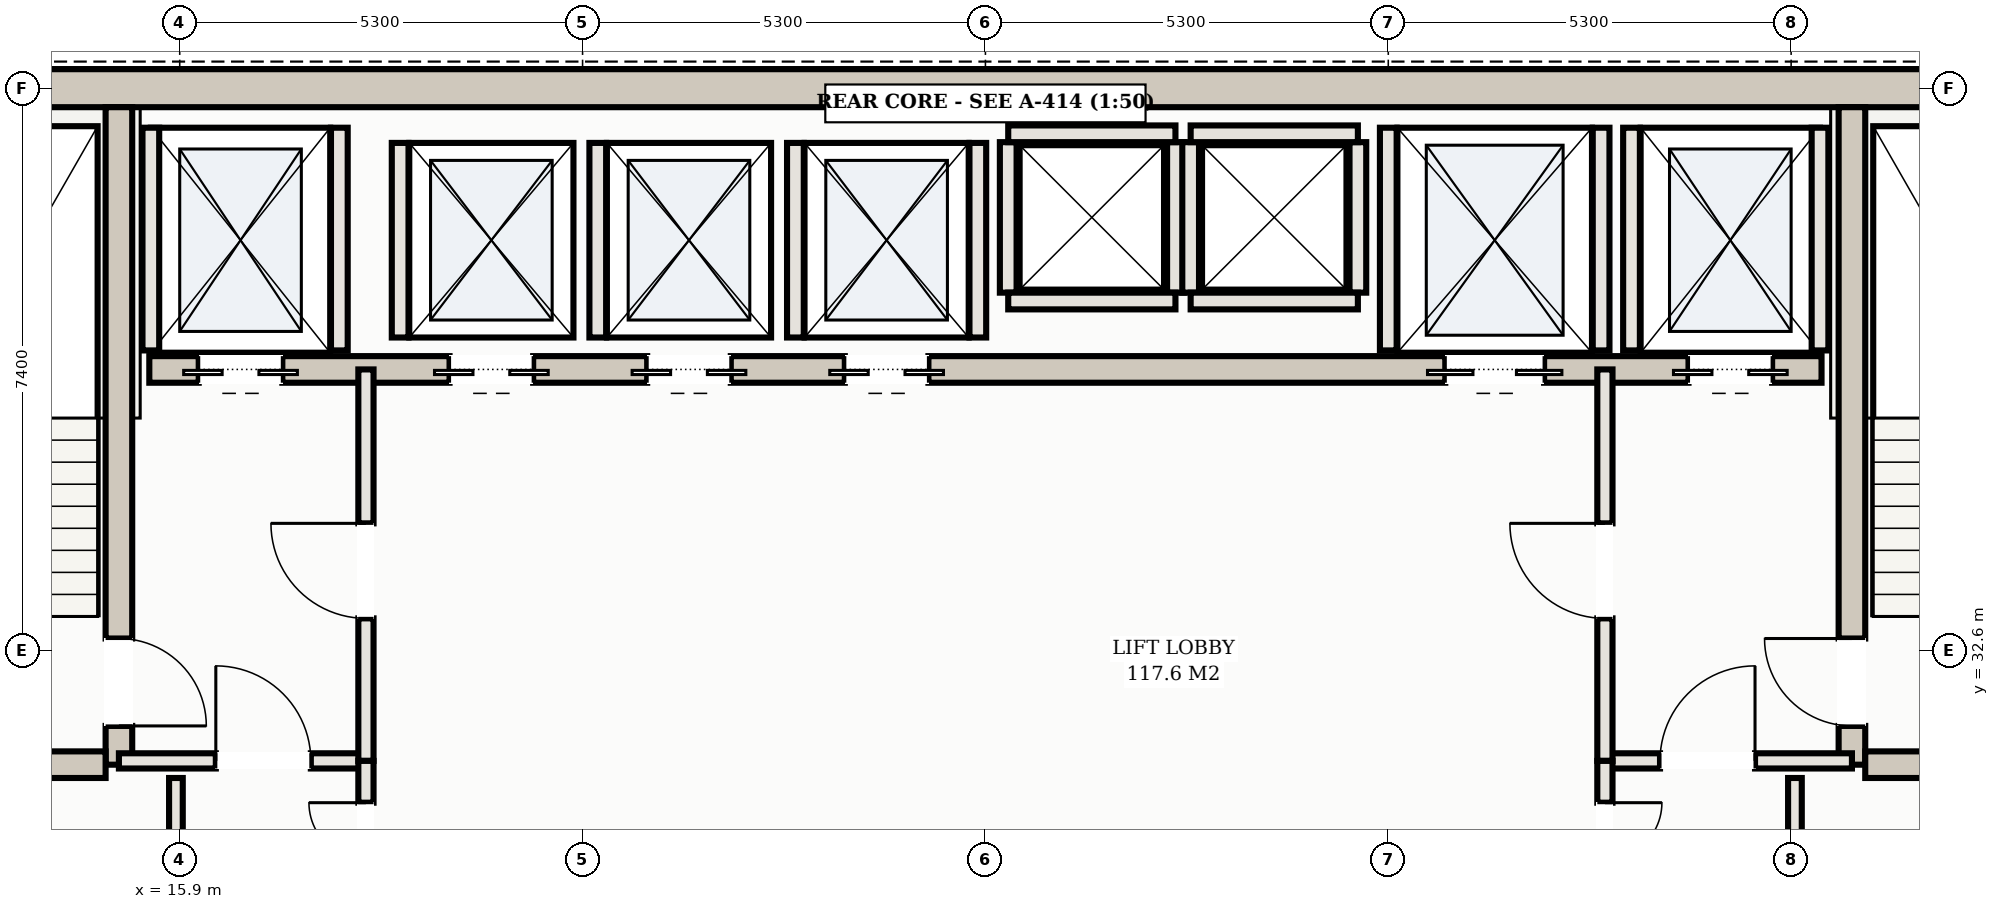
"""IFC4 building model, lengths in metres.
Left out: names, types, materials, properties, quantities, classifications, styles, units other than length and angle.
Written with IfcOpenShell. Run it as: python <this file> out.ifc"""

import sys

from ifc_helpers import new_model, si_unit, direction, frame, frame_2d, origin, place, context, subcontext, project, spatial, rectangle, extrude, element, fill, save


model = new_model("IFC4")
c1 = context("Model", 3, precision=1e-05, world=origin(), true_north=direction((0.0, 1.0)))
c2 = subcontext(c1, "Body", "Model", "MODEL_VIEW")
j1 = project(units=[si_unit("LENGTHUNIT", "METRE"), si_unit("PLANEANGLEUNIT", "RADIAN")], contexts=[c1])
p1 = place(None, origin())
s1 = spatial("IfcSite", under=j1, at=p1, CompositionType="ELEMENT")
p2 = place(p1, origin())
s2 = spatial("IfcBuilding", under=s1, at=p2, CompositionType="ELEMENT")
p3 = place(p2, frame((0.0, 0.0, 203.3)))
s3 = spatial("IfcBuildingStorey", under=s2, at=p3, CompositionType="ELEMENT", Elevation=203.3)
p4 = place(p3, frame((10.35, 40.0, 0.0), z_axis=(0.0, 0.0, 1.0), x_axis=(1.0, 0.0, 0.0)))
e1 = element("IfcWall", 1, at=p4, inside=s3, PredefinedType="SHEAR", context=c2, shape_type="SweptSolid", body=[
    extrude(rectangle(XDim=32.3, YDim=0.5, at=frame_2d((16.15, 0.0))), origin(), (0.0, 0.0, 1.0), 3.11),
])
p5 = place(p3, frame((15.1, 31.1, 0.0), z_axis=(0.0, 0.0, 1.0), x_axis=(0.0, 1.0, 0.0)))
e2 = element("IfcWall", 2, at=p5, inside=s3, PredefinedType="SHEAR", context=c2, shape_type="SweptSolid", body=[
    extrude(rectangle(XDim=8.65, YDim=0.35, at=frame_2d((4.325, 0.0))), origin(), (0.0, 0.0, 1.0), 3.11),
])
p6 = place(p5, frame((0.51, 0.0, 0.0)))
e3 = element("IfcOpeningElement", 3, at=p6, cuts=e2, PredefinedType="OPENING", context=c2, shape_type="SweptSolid", body=[
    extrude(rectangle(XDim=1.15, YDim=2.2, at=frame_2d((0.575, 1.1))), frame((0.0, 0.185, 0.0), z_axis=(0.0, -1.0, 0.0), x_axis=(1.0, 0.0, 0.0)), (0.0, 0.0, 1.0), 0.37),
])
p7 = place(p3, frame((10.85, 31.1, 0.0), z_axis=(0.0, 0.0, 1.0), x_axis=(1.0, 0.0, 0.0)))
e4 = element("IfcWall", 4, at=p7, inside=s3, PredefinedType="SHEAR", context=c2, shape_type="SweptSolid", body=[
    extrude(rectangle(XDim=4.075, YDim=0.35, at=frame_2d((2.038, 0.0))), origin(), (0.0, 0.0, 1.0), 3.11),
])
p8 = place(p3, frame((37.9, 31.1, 0.0), z_axis=(0.0, 0.0, 1.0), x_axis=(0.0, 1.0, 0.0)))
e5 = element("IfcWall", 5, at=p8, inside=s3, PredefinedType="SHEAR", context=c2, shape_type="SweptSolid", body=[
    extrude(rectangle(XDim=8.65, YDim=0.35, at=frame_2d((4.325, 0.0))), origin(), (0.0, 0.0, 1.0), 3.11),
])
p9 = place(p8, frame((0.51, 0.0, 0.0)))
e6 = element("IfcOpeningElement", 6, at=p9, cuts=e5, PredefinedType="OPENING", context=c2, shape_type="SweptSolid", body=[
    extrude(rectangle(XDim=1.15, YDim=2.2, at=frame_2d((0.575, 1.1))), frame((0.0, 0.185, 0.0), z_axis=(0.0, -1.0, 0.0), x_axis=(1.0, 0.0, 0.0)), (0.0, 0.0, 1.0), 0.37),
])
p10 = place(p3, frame((38.075, 31.1, 0.0), z_axis=(0.0, 0.0, 1.0), x_axis=(1.0, 0.0, 0.0)))
e7 = element("IfcWall", 7, at=p10, inside=s3, PredefinedType="SHEAR", context=c2, shape_type="SweptSolid", body=[
    extrude(rectangle(XDim=4.075, YDim=0.35, at=frame_2d((2.038, 0.0))), origin(), (0.0, 0.0, 1.0), 3.11),
])
p11 = place(p3, frame((15.5, 36.3, 0.0), z_axis=(0.0, 0.0, 1.0), x_axis=(1.0, 0.0, 0.0)))
e8 = element("IfcWall", 8, at=p11, inside=s3, PredefinedType="SHEAR", context=c2, shape_type="SweptSolid", body=[
    extrude(rectangle(XDim=22.0, YDim=0.35, at=frame_2d((11.0, 0.0))), origin(), (0.0, 0.0, 1.0), 3.11),
])
p12 = place(p11, frame((0.65, 0.0, 0.0)))
e9 = element("IfcOpeningElement", 9, at=p12, cuts=e8, PredefinedType="OPENING", context=c2, shape_type="SweptSolid", body=[
    extrude(rectangle(XDim=1.1, YDim=2.15, at=frame_2d((0.55, 1.075))), frame((0.0, 0.185, 0.0), z_axis=(0.0, -1.0, 0.0), x_axis=(1.0, 0.0, 0.0)), (0.0, 0.0, 1.0), 0.37),
])
p13 = place(p11, frame((20.25, 0.0, 0.0)))
e10 = element("IfcOpeningElement", 10, at=p13, cuts=e8, PredefinedType="OPENING", context=c2, shape_type="SweptSolid", body=[
    extrude(rectangle(XDim=1.1, YDim=2.15, at=frame_2d((0.55, 1.075))), frame((0.0, 0.185, 0.0), z_axis=(0.0, -1.0, 0.0), x_axis=(1.0, 0.0, 0.0)), (0.0, 0.0, 1.0), 0.37),
])
p14 = place(p11, frame((17.05, 0.0, 0.0)))
e11 = element("IfcOpeningElement", 11, at=p14, cuts=e8, PredefinedType="OPENING", context=c2, shape_type="SweptSolid", body=[
    extrude(rectangle(XDim=1.3, YDim=2.2, at=frame_2d((0.65, 1.1))), frame((0.0, 0.185, 0.0), z_axis=(0.0, -1.0, 0.0), x_axis=(1.0, 0.0, 0.0)), (0.0, 0.0, 1.0), 0.37),
])
p15 = place(p11, frame((3.95, 0.0, 0.0)))
e12 = element("IfcOpeningElement", 12, at=p15, cuts=e8, PredefinedType="OPENING", context=c2, shape_type="SweptSolid", body=[
    extrude(rectangle(XDim=1.1, YDim=2.15, at=frame_2d((0.55, 1.075))), frame((0.0, 0.185, 0.0), z_axis=(0.0, -1.0, 0.0), x_axis=(1.0, 0.0, 0.0)), (0.0, 0.0, 1.0), 0.37),
])
p16 = place(p11, frame((6.55, 0.0, 0.0)))
e13 = element("IfcOpeningElement", 13, at=p16, cuts=e8, PredefinedType="OPENING", context=c2, shape_type="SweptSolid", body=[
    extrude(rectangle(XDim=1.1, YDim=2.15, at=frame_2d((0.55, 1.075))), frame((0.0, 0.185, 0.0), z_axis=(0.0, -1.0, 0.0), x_axis=(1.0, 0.0, 0.0)), (0.0, 0.0, 1.0), 0.37),
])
p17 = place(p11, frame((9.15, 0.0, 0.0)))
e14 = element("IfcOpeningElement", 14, at=p17, cuts=e8, PredefinedType="OPENING", context=c2, shape_type="SweptSolid", body=[
    extrude(rectangle(XDim=1.1, YDim=2.15, at=frame_2d((0.55, 1.075))), frame((0.0, 0.185, 0.0), z_axis=(0.0, -1.0, 0.0), x_axis=(1.0, 0.0, 0.0)), (0.0, 0.0, 1.0), 0.37),
])
for number, where, z_axis, x_axis in (
    (15, (15.52, 36.55, 0.0), (0.0, 0.0, 1.0), (0.0, 1.0, 0.0)),
    (16, (18.0, 36.55, 0.0), (0.0, 0.0, 1.0), (0.0, 1.0, 0.0)),
    (17, (35.0, 36.55, 0.0), (0.0, 0.0, 1.0), (0.0, 1.0, 0.0)),
    (18, (37.48, 36.55, 0.0), (0.0, 0.0, 1.0), (0.0, 1.0, 0.0)),
    (19, (31.8, 36.55, 0.0), (0.0, 0.0, 1.0), (0.0, 1.0, 0.0)),
    (20, (34.6, 36.55, 0.0), (0.0, 0.0, 1.0), (0.0, 1.0, 0.0)),
):
    element("IfcWall", number, at=place(p3, frame(where, z_axis=z_axis, x_axis=x_axis)), inside=s3, PredefinedType="SOLIDWALL", context=c2, shape_type="SweptSolid", body=[
        extrude(rectangle(XDim=2.93, YDim=0.22, at=frame_2d((1.465, 0.0))), origin(), (0.0, 0.0, 1.0), 3.11),
    ])
for number, where, z_axis, x_axis in (
    (21, (18.8, 36.72, 0.0), (0.0, 0.0, 1.0), (0.0, 1.0, 0.0)),
    (22, (21.4, 36.72, 0.0), (0.0, 0.0, 1.0), (0.0, 1.0, 0.0)),
    (23, (24.0, 36.72, 0.0), (0.0, 0.0, 1.0), (0.0, 1.0, 0.0)),
    (24, (26.4, 36.72, 0.0), (0.0, 0.0, 1.0), (0.0, 1.0, 0.0)),
):
    element("IfcWall", number, at=place(p3, frame(where, z_axis=z_axis, x_axis=x_axis)), inside=s3, PredefinedType="SOLIDWALL", context=c2, shape_type="SweptSolid", body=[
        extrude(rectangle(XDim=2.56, YDim=0.22, at=frame_2d((1.28, 0.0))), origin(), (0.0, 0.0, 1.0), 3.11),
    ])
for number, where, z_axis, x_axis in (
    (25, (26.8, 37.31, 0.0), (0.0, 0.0, 1.0), (0.0, 1.0, 0.0)),
    (26, (29.0, 37.31, 0.0), (0.0, 0.0, 1.0), (0.0, 1.0, 0.0)),
):
    element("IfcWall", number, at=place(p3, frame(where, z_axis=z_axis, x_axis=x_axis)), inside=s3, PredefinedType="SOLIDWALL", context=c2, shape_type="SweptSolid", body=[
        extrude(rectangle(XDim=1.98, YDim=0.22, at=frame_2d((0.99, 0.0))), origin(), (0.0, 0.0, 1.0), 3.11),
    ])
for number, where, z_axis, x_axis in (
    (27, (26.8, 39.4, 0.0), (0.0, 0.0, 1.0), (1.0, 0.0, 0.0)),
    (28, (26.8, 37.2, 0.0), (0.0, 0.0, 1.0), (1.0, 0.0, 0.0)),
):
    element("IfcWall", number, at=place(p3, frame(where, z_axis=z_axis, x_axis=x_axis)), inside=s3, PredefinedType="SOLIDWALL", context=c2, shape_type="SweptSolid", body=[
        extrude(rectangle(XDim=2.2, YDim=0.22, at=frame_2d((1.1, 0.0))), origin(), (0.0, 0.0, 1.0), 3.11),
    ])
for number, where, z_axis, x_axis in (
    (29, (29.2, 37.31, 0.0), (0.0, 0.0, 1.0), (0.0, 1.0, 0.0)),
    (30, (31.4, 37.31, 0.0), (0.0, 0.0, 1.0), (0.0, 1.0, 0.0)),
):
    element("IfcWall", number, at=place(p3, frame(where, z_axis=z_axis, x_axis=x_axis)), inside=s3, PredefinedType="SOLIDWALL", context=c2, shape_type="SweptSolid", body=[
        extrude(rectangle(XDim=1.98, YDim=0.22, at=frame_2d((0.99, 0.0))), origin(), (0.0, 0.0, 1.0), 3.11),
    ])
for number, where, z_axis, x_axis in (
    (31, (29.2, 39.4, 0.0), (0.0, 0.0, 1.0), (1.0, 0.0, 0.0)),
    (32, (29.2, 37.2, 0.0), (0.0, 0.0, 1.0), (1.0, 0.0, 0.0)),
):
    element("IfcWall", number, at=place(p3, frame(where, z_axis=z_axis, x_axis=x_axis)), inside=s3, PredefinedType="SOLIDWALL", context=c2, shape_type="SweptSolid", body=[
        extrude(rectangle(XDim=2.2, YDim=0.22, at=frame_2d((1.1, 0.0))), origin(), (0.0, 0.0, 1.0), 3.11),
    ])
p18 = place(p3, frame((15.1, 31.15, 0.0), z_axis=(0.0, 0.0, 1.0), x_axis=(1.0, 0.0, 0.0)))
e33 = element("IfcWall", 33, at=p18, inside=s3, PredefinedType="PARTITIONING", context=c2, shape_type="SweptSolid", body=[
    extrude(rectangle(XDim=3.25, YDim=0.2, at=frame_2d((1.625, 0.0))), origin(), (0.0, 0.0, 1.0), 2.43),
])
p19 = place(p18, frame((1.275, 0.0, 0.0)))
e34 = element("IfcOpeningElement", 34, at=p19, cuts=e33, PredefinedType="OPENING", context=c2, shape_type="SweptSolid", body=[
    extrude(rectangle(XDim=1.25, YDim=2.2, at=frame_2d((0.625, 1.1))), frame((0.0, 0.11, 0.0), z_axis=(0.0, -1.0, 0.0), x_axis=(1.0, 0.0, 0.0)), (0.0, 0.0, 1.0), 0.22),
])
p20 = place(p3, frame((18.35, 31.15, 0.0), z_axis=(0.0, 0.0, 1.0), x_axis=(0.0, 1.0, 0.0)))
e35 = element("IfcWall", 35, at=p20, inside=s3, PredefinedType="PARTITIONING", context=c2, shape_type="SweptSolid", body=[
    extrude(rectangle(XDim=5.15, YDim=0.2, at=frame_2d((2.575, 0.0))), origin(), (0.0, 0.0, 1.0), 2.43),
])
p21 = place(p20, frame((1.875, 0.0, 0.0)))
e36 = element("IfcOpeningElement", 36, at=p21, cuts=e35, PredefinedType="OPENING", context=c2, shape_type="SweptSolid", body=[
    extrude(rectangle(XDim=1.25, YDim=2.2, at=frame_2d((0.625, 1.1))), frame((0.0, 0.11, 0.0), z_axis=(0.0, -1.0, 0.0), x_axis=(1.0, 0.0, 0.0)), (0.0, 0.0, 1.0), 0.22),
])
p22 = place(p3, frame((34.65, 31.15, 0.0), z_axis=(0.0, 0.0, 1.0), x_axis=(1.0, 0.0, 0.0)))
e37 = element("IfcWall", 37, at=p22, inside=s3, PredefinedType="PARTITIONING", context=c2, shape_type="SweptSolid", body=[
    extrude(rectangle(XDim=3.25, YDim=0.2, at=frame_2d((1.625, 0.0))), origin(), (0.0, 0.0, 1.0), 2.43),
])
p23 = place(p22, frame((0.725, 0.0, 0.0)))
e38 = element("IfcOpeningElement", 38, at=p23, cuts=e37, PredefinedType="OPENING", context=c2, shape_type="SweptSolid", body=[
    extrude(rectangle(XDim=1.25, YDim=2.2, at=frame_2d((0.625, 1.1))), frame((0.0, 0.11, 0.0), z_axis=(0.0, -1.0, 0.0), x_axis=(1.0, 0.0, 0.0)), (0.0, 0.0, 1.0), 0.22),
])
p24 = place(p3, frame((34.65, 31.15, 0.0), z_axis=(0.0, 0.0, 1.0), x_axis=(0.0, 1.0, 0.0)))
e39 = element("IfcWall", 39, at=p24, inside=s3, PredefinedType="PARTITIONING", context=c2, shape_type="SweptSolid", body=[
    extrude(rectangle(XDim=5.15, YDim=0.2, at=frame_2d((2.575, 0.0))), origin(), (0.0, 0.0, 1.0), 2.43),
])
p25 = place(p24, frame((1.875, 0.0, 0.0)))
e40 = element("IfcOpeningElement", 40, at=p25, cuts=e39, PredefinedType="OPENING", context=c2, shape_type="SweptSolid", body=[
    extrude(rectangle(XDim=1.25, YDim=2.2, at=frame_2d((0.625, 1.1))), frame((0.0, 0.11, 0.0), z_axis=(0.0, -1.0, 0.0), x_axis=(1.0, 0.0, 0.0)), (0.0, 0.0, 1.0), 0.22),
])
p26 = place(p3, frame((15.85, 25.45, 0.0), z_axis=(0.0, 0.0, 1.0), x_axis=(0.0, 1.0, 0.0)))
e41 = element("IfcWall", 41, at=p26, inside=s3, PredefinedType="PARTITIONING", context=c2, shape_type="SweptSolid", body=[
    extrude(rectangle(XDim=5.475, YDim=0.18, at=frame_2d((2.738, 0.0))), origin(), (0.0, 0.0, 1.0), 2.43),
])
p27 = place(p26, frame((2.277, 0.0, 0.0)))
e42 = element("IfcOpeningElement", 42, at=p27, cuts=e41, PredefinedType="OPENING", context=c2, shape_type="SweptSolid", body=[
    extrude(rectangle(XDim=0.92, YDim=2.15, at=frame_2d((0.46, 1.075))), frame((0.0, 0.1, 0.0), z_axis=(0.0, -1.0, 0.0), x_axis=(1.0, 0.0, 0.0)), (0.0, 0.0, 1.0), 0.2),
])
p28 = place(p3, frame((37.15, 25.45, 0.0), z_axis=(0.0, 0.0, 1.0), x_axis=(0.0, 1.0, 0.0)))
e43 = element("IfcWall", 43, at=p28, inside=s3, PredefinedType="PARTITIONING", context=c2, shape_type="SweptSolid", body=[
    extrude(rectangle(XDim=5.475, YDim=0.18, at=frame_2d((2.738, 0.0))), origin(), (0.0, 0.0, 1.0), 2.43),
])
p29 = place(p28, frame((2.277, 0.0, 0.0)))
e44 = element("IfcOpeningElement", 44, at=p29, cuts=e43, PredefinedType="OPENING", context=c2, shape_type="SweptSolid", body=[
    extrude(rectangle(XDim=0.92, YDim=2.15, at=frame_2d((0.46, 1.075))), frame((0.0, 0.1, 0.0), z_axis=(0.0, -1.0, 0.0), x_axis=(1.0, 0.0, 0.0)), (0.0, 0.0, 1.0), 0.2),
])
p30 = place(p3, frame((18.35, 28.55, 0.0), z_axis=(0.0, 0.0, 1.0), x_axis=(0.0, 1.0, 0.0)))
e45 = element("IfcWall", 45, at=p30, inside=s3, PredefinedType="PARTITIONING", context=c2, shape_type="SweptSolid", body=[
    extrude(rectangle(XDim=2.6, YDim=0.2, at=frame_2d((1.3, 0.0))), origin(), (0.0, 0.0, 1.0), 2.43),
])
p31 = place(p30, frame((0.55, 0.0, 0.0)))
e46 = element("IfcOpeningElement", 46, at=p31, cuts=e45, PredefinedType="OPENING", context=c2, shape_type="SweptSolid", body=[
    extrude(rectangle(XDim=1.5, YDim=2.25, at=frame_2d((0.75, 1.125))), frame((0.0, 0.11, 0.0), z_axis=(0.0, -1.0, 0.0), x_axis=(1.0, 0.0, 0.0)), (0.0, 0.0, 1.0), 0.22),
])
p32 = place(p3, frame((34.65, 28.55, 0.0), z_axis=(0.0, 0.0, 1.0), x_axis=(0.0, 1.0, 0.0)))
e47 = element("IfcWall", 47, at=p32, inside=s3, PredefinedType="PARTITIONING", context=c2, shape_type="SweptSolid", body=[
    extrude(rectangle(XDim=2.6, YDim=0.2, at=frame_2d((1.3, 0.0))), origin(), (0.0, 0.0, 1.0), 2.43),
])
p33 = place(p32, frame((0.55, 0.0, 0.0)))
e48 = element("IfcOpeningElement", 48, at=p33, cuts=e47, PredefinedType="OPENING", context=c2, shape_type="SweptSolid", body=[
    extrude(rectangle(XDim=1.5, YDim=2.25, at=frame_2d((0.75, 1.125))), frame((0.0, 0.11, 0.0), z_axis=(0.0, -1.0, 0.0), x_axis=(1.0, 0.0, 0.0)), (0.0, 0.0, 1.0), 0.22),
])
p34 = place(p12, frame((1.1, 0.0, 0.0), z_axis=(0.0, 0.0, 1.0), x_axis=(-1.0, 0.0, 0.0)))
e49 = element("IfcDoor", 49, at=p34, inside=s3, OperationType="DOUBLE_DOOR_SLIDING", PredefinedType="DOOR", context=c2, shape_type="SweptSolid", body=[
    extrude(rectangle(XDim=1.1, YDim=2.15, at=frame_2d((0.55, 1.075))), frame((0.0, 0.025, 0.0), z_axis=(0.0, -1.0, 0.0), x_axis=(1.0, 0.0, 0.0)), (0.0, 0.0, 1.0), 0.05),
])
fill(e9, e49)
p35 = place(p13, frame((1.1, 0.0, 0.0), z_axis=(0.0, 0.0, 1.0), x_axis=(-1.0, 0.0, 0.0)))
e50 = element("IfcDoor", 50, at=p35, inside=s3, OperationType="DOUBLE_DOOR_SLIDING", PredefinedType="DOOR", context=c2, shape_type="SweptSolid", body=[
    extrude(rectangle(XDim=1.1, YDim=2.15, at=frame_2d((0.55, 1.075))), frame((0.0, 0.025, 0.0), z_axis=(0.0, -1.0, 0.0), x_axis=(1.0, 0.0, 0.0)), (0.0, 0.0, 1.0), 0.05),
])
fill(e10, e50)
p36 = place(p14, frame((1.3, 0.0, 0.0), z_axis=(0.0, 0.0, 1.0), x_axis=(-1.0, 0.0, 0.0)))
e51 = element("IfcDoor", 51, at=p36, inside=s3, OperationType="DOUBLE_DOOR_SLIDING", PredefinedType="DOOR", context=c2, shape_type="SweptSolid", body=[
    extrude(rectangle(XDim=1.3, YDim=2.2, at=frame_2d((0.65, 1.1))), frame((0.0, 0.025, 0.0), z_axis=(0.0, -1.0, 0.0), x_axis=(1.0, 0.0, 0.0)), (0.0, 0.0, 1.0), 0.05),
])
fill(e11, e51)
p37 = place(p15, frame((1.1, 0.0, 0.0), z_axis=(0.0, 0.0, 1.0), x_axis=(-1.0, 0.0, 0.0)))
e52 = element("IfcDoor", 52, at=p37, inside=s3, OperationType="DOUBLE_DOOR_SLIDING", PredefinedType="DOOR", context=c2, shape_type="SweptSolid", body=[
    extrude(rectangle(XDim=1.1, YDim=2.15, at=frame_2d((0.55, 1.075))), frame((0.0, 0.025, 0.0), z_axis=(0.0, -1.0, 0.0), x_axis=(1.0, 0.0, 0.0)), (0.0, 0.0, 1.0), 0.05),
])
fill(e12, e52)
p38 = place(p16, frame((1.1, 0.0, 0.0), z_axis=(0.0, 0.0, 1.0), x_axis=(-1.0, 0.0, 0.0)))
e53 = element("IfcDoor", 53, at=p38, inside=s3, OperationType="DOUBLE_DOOR_SLIDING", PredefinedType="DOOR", context=c2, shape_type="SweptSolid", body=[
    extrude(rectangle(XDim=1.1, YDim=2.15, at=frame_2d((0.55, 1.075))), frame((0.0, 0.025, 0.0), z_axis=(0.0, -1.0, 0.0), x_axis=(1.0, 0.0, 0.0)), (0.0, 0.0, 1.0), 0.05),
])
fill(e13, e53)
p39 = place(p17, frame((1.1, 0.0, 0.0), z_axis=(0.0, 0.0, 1.0), x_axis=(-1.0, 0.0, 0.0)))
e54 = element("IfcDoor", 54, at=p39, inside=s3, OperationType="DOUBLE_DOOR_SLIDING", PredefinedType="DOOR", context=c2, shape_type="SweptSolid", body=[
    extrude(rectangle(XDim=1.1, YDim=2.15, at=frame_2d((0.55, 1.075))), frame((0.0, 0.025, 0.0), z_axis=(0.0, -1.0, 0.0), x_axis=(1.0, 0.0, 0.0)), (0.0, 0.0, 1.0), 0.05),
])
fill(e14, e54)
p40 = place(p19, origin())
e55 = element("IfcDoor", 55, at=p40, inside=s3, OperationType="SINGLE_SWING_LEFT", PredefinedType="DOOR", context=c2, shape_type="SweptSolid", body=[
    extrude(rectangle(XDim=1.25, YDim=2.2, at=frame_2d((0.625, 1.1))), frame((0.0, 0.025, 0.0), z_axis=(0.0, -1.0, 0.0), x_axis=(1.0, 0.0, 0.0)), (0.0, 0.0, 1.0), 0.05),
])
fill(e34, e55)
p41 = place(p21, origin())
e56 = element("IfcDoor", 56, at=p41, inside=s3, OperationType="SINGLE_SWING_RIGHT", PredefinedType="DOOR", context=c2, shape_type="SweptSolid", body=[
    extrude(rectangle(XDim=1.25, YDim=2.2, at=frame_2d((0.625, 1.1))), frame((0.0, 0.025, 0.0), z_axis=(0.0, -1.0, 0.0), x_axis=(1.0, 0.0, 0.0)), (0.0, 0.0, 1.0), 0.05),
])
fill(e36, e56)
p42 = place(p23, origin())
e57 = element("IfcDoor", 57, at=p42, inside=s3, OperationType="SINGLE_SWING_RIGHT", PredefinedType="DOOR", context=c2, shape_type="SweptSolid", body=[
    extrude(rectangle(XDim=1.25, YDim=2.2, at=frame_2d((0.625, 1.1))), frame((0.0, 0.025, 0.0), z_axis=(0.0, -1.0, 0.0), x_axis=(1.0, 0.0, 0.0)), (0.0, 0.0, 1.0), 0.05),
])
fill(e38, e57)
p43 = place(p25, origin())
e58 = element("IfcDoor", 58, at=p43, inside=s3, OperationType="SINGLE_SWING_RIGHT", PredefinedType="DOOR", context=c2, shape_type="SweptSolid", body=[
    extrude(rectangle(XDim=1.25, YDim=2.2, at=frame_2d((0.625, 1.1))), frame((0.0, 0.025, 0.0), z_axis=(0.0, -1.0, 0.0), x_axis=(1.0, 0.0, 0.0)), (0.0, 0.0, 1.0), 0.05),
])
fill(e40, e58)
p44 = place(p6, frame((1.15, 0.0, 0.0), z_axis=(0.0, 0.0, 1.0), x_axis=(-1.0, 0.0, 0.0)))
e59 = element("IfcDoor", 59, at=p44, inside=s3, OperationType="SINGLE_SWING_RIGHT", PredefinedType="DOOR", context=c2, shape_type="SweptSolid", body=[
    extrude(rectangle(XDim=1.15, YDim=2.2, at=frame_2d((0.575, 1.1))), frame((0.0, 0.025, 0.0), z_axis=(0.0, -1.0, 0.0), x_axis=(1.0, 0.0, 0.0)), (0.0, 0.0, 1.0), 0.05),
])
fill(e3, e59)
p45 = place(p9, origin())
e60 = element("IfcDoor", 60, at=p45, inside=s3, OperationType="SINGLE_SWING_RIGHT", PredefinedType="DOOR", context=c2, shape_type="SweptSolid", body=[
    extrude(rectangle(XDim=1.15, YDim=2.2, at=frame_2d((0.575, 1.1))), frame((0.0, 0.025, 0.0), z_axis=(0.0, -1.0, 0.0), x_axis=(1.0, 0.0, 0.0)), (0.0, 0.0, 1.0), 0.05),
])
fill(e6, e60)
p46 = place(p31, origin())
e61 = element("IfcDoor", 61, at=p46, inside=s3, OperationType="DOUBLE_DOOR_SINGLE_SWING", PredefinedType="DOOR", context=c2, shape_type="SweptSolid", body=[
    extrude(rectangle(XDim=1.5, YDim=2.25, at=frame_2d((0.75, 1.125))), frame((0.0, 0.025, 0.0), z_axis=(0.0, -1.0, 0.0), x_axis=(1.0, 0.0, 0.0)), (0.0, 0.0, 1.0), 0.05),
])
fill(e46, e61)
p47 = place(p33, frame((1.5, 0.0, 0.0), z_axis=(0.0, 0.0, 1.0), x_axis=(-1.0, 0.0, 0.0)))
e62 = element("IfcDoor", 62, at=p47, inside=s3, OperationType="DOUBLE_DOOR_SINGLE_SWING", PredefinedType="DOOR", context=c2, shape_type="SweptSolid", body=[
    extrude(rectangle(XDim=1.5, YDim=2.25, at=frame_2d((0.75, 1.125))), frame((0.0, 0.025, 0.0), z_axis=(0.0, -1.0, 0.0), x_axis=(1.0, 0.0, 0.0)), (0.0, 0.0, 1.0), 0.05),
])
fill(e48, e62)
save(model, sys.argv[1])
